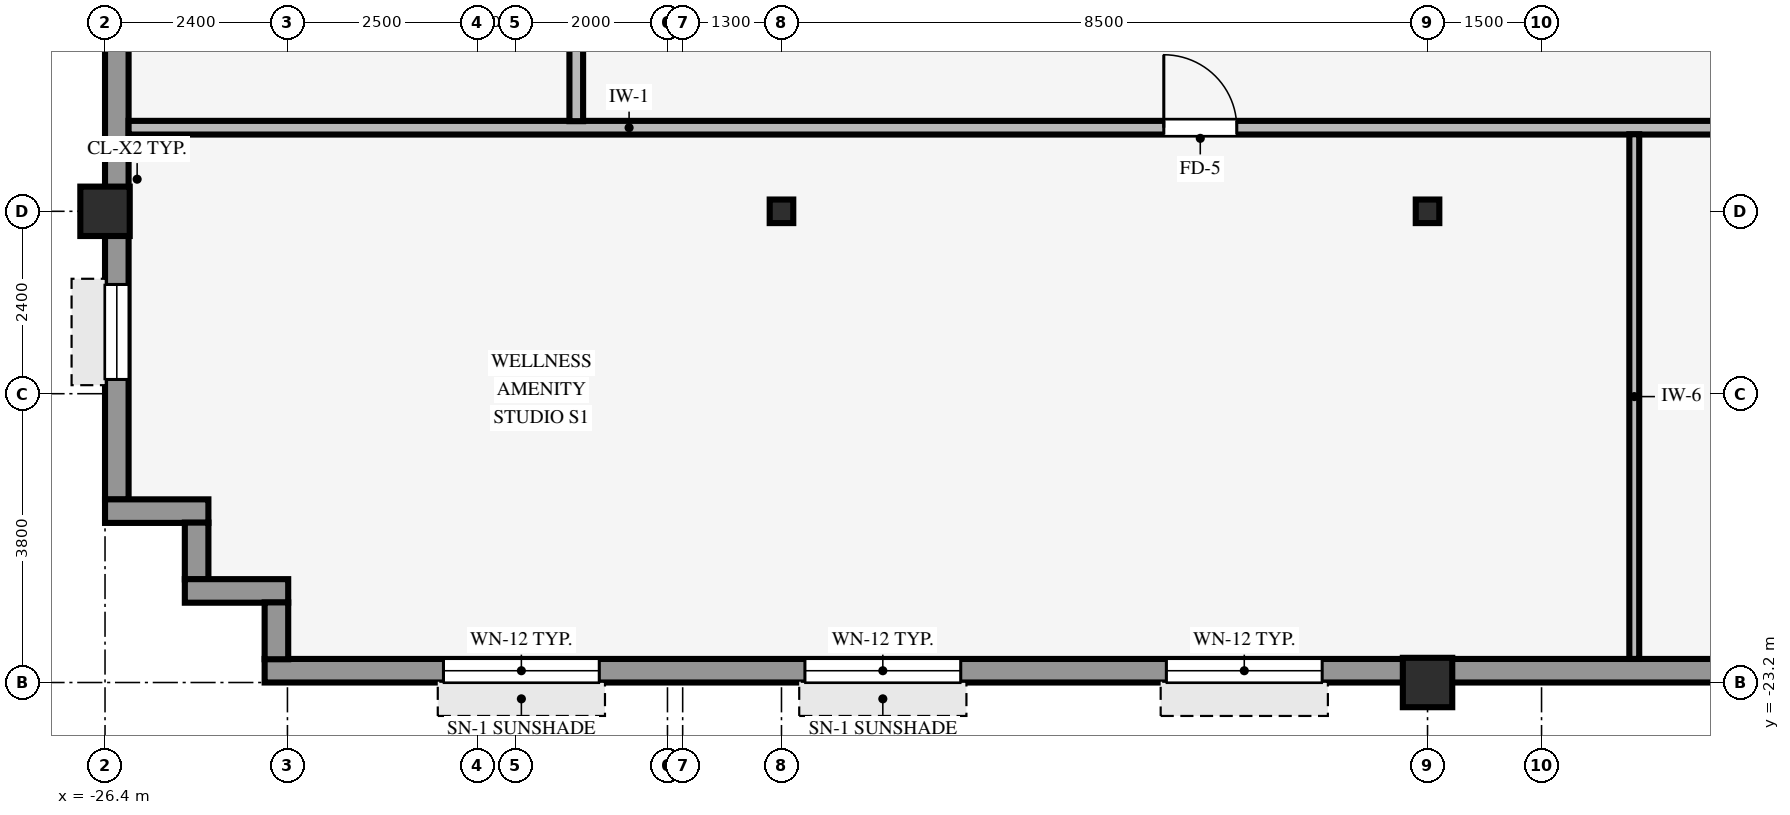
"""IFC4 building model, lengths in metres.
Left out: names, types, materials, properties, quantities, classifications, styles, units other than length and angle.
Written with IfcOpenShell. Run it as: python <this file> out.ifc"""

import sys

from ifc_helpers import new_model, si_unit, direction, frame, frame_2d, origin, origin_2d, place, context, subcontext, project, spatial, rectangle, hollow_rectangle, i_section, extrude, source, transform, mapped, element, fill, save


model = new_model("IFC4")
c1 = context("Model", 3, precision=1e-05, world=origin(), true_north=direction((0.0, 1.0)))
c2 = subcontext(c1, "Body", "Model", "MODEL_VIEW")
j1 = project(units=[si_unit("LENGTHUNIT", "METRE"), si_unit("PLANEANGLEUNIT", "RADIAN")], contexts=[c1])
p1 = place(None, origin())
s1 = spatial("IfcSite", under=j1, at=p1, CompositionType="ELEMENT")
p2 = place(p1, origin())
s2 = spatial("IfcBuilding", under=s1, at=p2, CompositionType="ELEMENT")
p3 = place(p2, frame((0.0, 0.0, 171.3)))
s3 = spatial("IfcBuildingStorey", under=s2, at=p3, CompositionType="ELEMENT", Elevation=171.3)
for number, where, z_axis, x_axis in (
    (1, (-26.4, -17.0, 0.0), (0.0, 0.0, 1.0), (1.0, 0.0, 0.0)),
    (2, (-9.0, -23.2, 0.0), (0.0, 0.0, 1.0), (1.0, 0.0, 0.0)),
):
    element("IfcColumn", number, at=place(p3, frame(where, z_axis=z_axis, x_axis=x_axis)), inside=s3, PredefinedType="COLUMN", context=c2, shape_type="SweptSolid", body=[
        extrude(hollow_rectangle(XDim=0.65, YDim=0.65, WallThickness=0.04, InnerFilletRadius=0.04, OuterFilletRadius=0.08, at=origin_2d()), origin(), (0.0, 0.0, 1.0), 3.37),
    ])
for number, where, z_axis, x_axis in (
    (3, (-17.5, -17.0, 0.0), (0.0, 0.0, 1.0), (1.0, 0.0, 0.0)),
    (4, (-9.0, -17.0, 0.0), (0.0, 0.0, 1.0), (1.0, 0.0, 0.0)),
):
    element("IfcColumn", number, at=place(p3, frame(where, z_axis=z_axis, x_axis=x_axis)), inside=s3, PredefinedType="COLUMN", context=c2, shape_type="SweptSolid", body=[
        extrude(i_section(OverallWidth=0.31, OverallDepth=0.31, WebThickness=0.015, FlangeThickness=0.015, FilletRadius=0.015, at=origin_2d()), origin(), (0.0, 0.0, 1.0), 3.37),
    ])
p4 = place(p3, frame((-24.3, -23.045, 0.0), z_axis=(0.0, 0.0, 1.0), x_axis=(1.0, 0.0, 0.0)))
e5 = element("IfcWall", 5, at=p4, inside=s3, PredefinedType="STANDARD", context=c2, shape_type="SweptSolid", body=[
    extrude(rectangle(XDim=44.8, YDim=0.31, at=frame_2d((22.4, 0.0))), origin(), (0.0, 0.0, 1.0), 2.705),
])
p5 = place(p4, frame((2.353, 0.0, 0.8)))
e6 = element("IfcOpeningElement", 6, at=p5, cuts=e5, PredefinedType="OPENING", context=c2, shape_type="SweptSolid", body=[
    extrude(rectangle(XDim=2.05, YDim=1.52, at=frame_2d((1.025, 0.76))), frame((0.0, 0.165, 0.0), z_axis=(0.0, -1.0, 0.0), x_axis=(1.0, 0.0, 0.0)), (0.0, 0.0, 1.0), 0.33),
])
p6 = place(p4, frame((7.108, 0.0, 0.8)))
e7 = element("IfcOpeningElement", 7, at=p6, cuts=e5, PredefinedType="OPENING", context=c2, shape_type="SweptSolid", body=[
    extrude(rectangle(XDim=2.05, YDim=1.52, at=frame_2d((1.025, 0.76))), frame((0.0, 0.165, 0.0), z_axis=(0.0, -1.0, 0.0), x_axis=(1.0, 0.0, 0.0)), (0.0, 0.0, 1.0), 0.33),
])
p7 = place(p4, frame((11.864, 0.0, 0.8)))
e8 = element("IfcOpeningElement", 8, at=p7, cuts=e5, PredefinedType="OPENING", context=c2, shape_type="SweptSolid", body=[
    extrude(rectangle(XDim=2.05, YDim=1.52, at=frame_2d((1.025, 0.76))), frame((0.0, 0.165, 0.0), z_axis=(0.0, -1.0, 0.0), x_axis=(1.0, 0.0, 0.0)), (0.0, 0.0, 1.0), 0.33),
])
p8 = place(p4, frame((21.375, 0.0, 0.8)))
e9 = element("IfcOpeningElement", 9, at=p8, cuts=e5, PredefinedType="OPENING", context=c2, shape_type="SweptSolid", body=[
    extrude(rectangle(XDim=2.05, YDim=1.52, at=frame_2d((1.025, 0.76))), frame((0.0, 0.165, 0.0), z_axis=(0.0, -1.0, 0.0), x_axis=(1.0, 0.0, 0.0)), (0.0, 0.0, 1.0), 0.33),
])
p9 = place(p4, frame((26.131, 0.0, 0.8)))
e10 = element("IfcOpeningElement", 10, at=p9, cuts=e5, PredefinedType="OPENING", context=c2, shape_type="SweptSolid", body=[
    extrude(rectangle(XDim=2.05, YDim=1.52, at=frame_2d((1.025, 0.76))), frame((0.0, 0.165, 0.0), z_axis=(0.0, -1.0, 0.0), x_axis=(1.0, 0.0, 0.0)), (0.0, 0.0, 1.0), 0.33),
])
p10 = place(p4, frame((29.986, 0.0, 0.8)))
e11 = element("IfcOpeningElement", 11, at=p10, cuts=e5, PredefinedType="OPENING", context=c2, shape_type="SweptSolid", body=[
    extrude(rectangle(XDim=2.05, YDim=1.52, at=frame_2d((1.025, 0.76))), frame((0.0, 0.165, 0.0), z_axis=(0.0, -1.0, 0.0), x_axis=(1.0, 0.0, 0.0)), (0.0, 0.0, 1.0), 0.33),
])
p11 = place(p4, frame((35.642, 0.0, 0.8)))
e12 = element("IfcOpeningElement", 12, at=p11, cuts=e5, PredefinedType="OPENING", context=c2, shape_type="SweptSolid", body=[
    extrude(rectangle(XDim=2.05, YDim=1.52, at=frame_2d((1.025, 0.76))), frame((0.0, 0.165, 0.0), z_axis=(0.0, -1.0, 0.0), x_axis=(1.0, 0.0, 0.0)), (0.0, 0.0, 1.0), 0.33),
])
p12 = place(p4, frame((40.397, 0.0, 0.8)))
e13 = element("IfcOpeningElement", 13, at=p12, cuts=e5, PredefinedType="OPENING", context=c2, shape_type="SweptSolid", body=[
    extrude(rectangle(XDim=2.05, YDim=1.52, at=frame_2d((1.025, 0.76))), frame((0.0, 0.165, 0.0), z_axis=(0.0, -1.0, 0.0), x_axis=(1.0, 0.0, 0.0)), (0.0, 0.0, 1.0), 0.33),
])
p13 = place(p3, frame((-26.245, -20.794, 0.0), z_axis=(0.0, 0.0, 1.0), x_axis=(0.0, 1.0, 0.0)))
e14 = element("IfcWall", 14, at=p13, inside=s3, PredefinedType="STANDARD", context=c2, shape_type="SweptSolid", body=[
    extrude(rectangle(XDim=37.788, YDim=0.31, at=frame_2d((18.894, 0.0))), origin(), (0.0, 0.0, 1.0), 2.705),
])
p14 = place(p13, frame((24.994, 0.0, 0.0)))
e15 = element("IfcOpeningElement", 15, at=p14, cuts=e14, PredefinedType="OPENING", context=c2, shape_type="SweptSolid", body=[
    extrude(rectangle(XDim=1.05, YDim=2.1, at=frame_2d((0.525, 1.05))), frame((0.0, 0.165, 0.0), z_axis=(0.0, -1.0, 0.0), x_axis=(1.0, 0.0, 0.0)), (0.0, 0.0, 1.0), 0.33),
])
p15 = place(p13, frame((1.581, 0.0, 0.8)))
e16 = element("IfcOpeningElement", 16, at=p15, cuts=e14, PredefinedType="OPENING", context=c2, shape_type="SweptSolid", body=[
    extrude(rectangle(XDim=1.25, YDim=1.52, at=frame_2d((0.625, 0.76))), frame((0.0, 0.165, 0.0), z_axis=(0.0, -1.0, 0.0), x_axis=(1.0, 0.0, 0.0)), (0.0, 0.0, 1.0), 0.33),
])
p16 = place(p13, frame((8.044, 0.0, 0.8)))
e17 = element("IfcOpeningElement", 17, at=p16, cuts=e14, PredefinedType="OPENING", context=c2, shape_type="SweptSolid", body=[
    extrude(rectangle(XDim=1.25, YDim=1.52, at=frame_2d((0.625, 0.76))), frame((0.0, 0.165, 0.0), z_axis=(0.0, -1.0, 0.0), x_axis=(1.0, 0.0, 0.0)), (0.0, 0.0, 1.0), 0.33),
])
p17 = place(p13, frame((13.156, 0.0, 0.8)))
e18 = element("IfcOpeningElement", 18, at=p17, cuts=e14, PredefinedType="OPENING", context=c2, shape_type="SweptSolid", body=[
    extrude(rectangle(XDim=1.25, YDim=1.52, at=frame_2d((0.625, 0.76))), frame((0.0, 0.165, 0.0), z_axis=(0.0, -1.0, 0.0), x_axis=(1.0, 0.0, 0.0)), (0.0, 0.0, 1.0), 0.33),
])
p18 = place(p13, frame((18.269, 0.0, 0.8)))
e19 = element("IfcOpeningElement", 19, at=p18, cuts=e14, PredefinedType="OPENING", context=c2, shape_type="SweptSolid", body=[
    extrude(rectangle(XDim=1.25, YDim=1.52, at=frame_2d((0.625, 0.76))), frame((0.0, 0.165, 0.0), z_axis=(0.0, -1.0, 0.0), x_axis=(1.0, 0.0, 0.0)), (0.0, 0.0, 1.0), 0.33),
])
p19 = place(p13, frame((23.382, 0.0, 0.8)))
e20 = element("IfcOpeningElement", 20, at=p19, cuts=e14, PredefinedType="OPENING", context=c2, shape_type="SweptSolid", body=[
    extrude(rectangle(XDim=1.25, YDim=1.52, at=frame_2d((0.625, 0.76))), frame((0.0, 0.165, 0.0), z_axis=(0.0, -1.0, 0.0), x_axis=(1.0, 0.0, 0.0)), (0.0, 0.0, 1.0), 0.33),
])
p20 = place(p13, frame((28.044, 0.0, 0.8)))
e21 = element("IfcOpeningElement", 21, at=p20, cuts=e14, PredefinedType="OPENING", context=c2, shape_type="SweptSolid", body=[
    extrude(rectangle(XDim=1.25, YDim=1.52, at=frame_2d((0.625, 0.76))), frame((0.0, 0.165, 0.0), z_axis=(0.0, -1.0, 0.0), x_axis=(1.0, 0.0, 0.0)), (0.0, 0.0, 1.0), 0.33),
])
p21 = place(p13, frame((33.607, 0.0, 0.8)))
e22 = element("IfcOpeningElement", 22, at=p21, cuts=e14, PredefinedType="OPENING", context=c2, shape_type="SweptSolid", body=[
    extrude(rectangle(XDim=1.25, YDim=1.52, at=frame_2d((0.625, 0.76))), frame((0.0, 0.165, 0.0), z_axis=(0.0, -1.0, 0.0), x_axis=(1.0, 0.0, 0.0)), (0.0, 0.0, 1.0), 0.33),
])
p22 = place(p3, frame((-26.4, -20.945, 0.0), z_axis=(0.0, 0.0, 1.0), x_axis=(1.0, 0.0, 0.0)))
e23 = element("IfcWall", 23, at=p22, inside=s3, PredefinedType="STANDARD", context=c2, shape_type="SweptSolid", body=[
    extrude(rectangle(XDim=1.36, YDim=0.31, at=frame_2d((0.68, 0.0))), origin(), (0.0, 0.0, 1.0), 3.36),
])
p23 = place(p3, frame((-25.195, -21.844, 0.0), z_axis=(0.0, 0.0, 1.0), x_axis=(0.0, 1.0, 0.0)))
e24 = element("IfcWall", 24, at=p23, inside=s3, PredefinedType="STANDARD", context=c2, shape_type="SweptSolid", body=[
    extrude(rectangle(XDim=0.748, YDim=0.31, at=frame_2d((0.374, 0.0))), origin(), (0.0, 0.0, 1.0), 3.36),
])
p24 = place(p3, frame((-25.35, -21.995, 0.0), z_axis=(0.0, 0.0, 1.0), x_axis=(1.0, 0.0, 0.0)))
e25 = element("IfcWall", 25, at=p24, inside=s3, PredefinedType="STANDARD", context=c2, shape_type="SweptSolid", body=[
    extrude(rectangle(XDim=1.36, YDim=0.31, at=frame_2d((0.68, 0.0))), origin(), (0.0, 0.0, 1.0), 3.36),
])
p25 = place(p3, frame((-24.145, -22.894, 0.0), z_axis=(0.0, 0.0, 1.0), x_axis=(0.0, 1.0, 0.0)))
e26 = element("IfcWall", 26, at=p25, inside=s3, PredefinedType="STANDARD", context=c2, shape_type="SweptSolid", body=[
    extrude(rectangle(XDim=0.748, YDim=0.31, at=frame_2d((0.374, 0.0))), origin(), (0.0, 0.0, 1.0), 3.36),
])
p26 = place(p3, frame((-26.09, -15.9, 0.0), z_axis=(0.0, 0.0, 1.0), x_axis=(1.0, 0.0, 0.0)))
e27 = element("IfcWall", 27, at=p26, inside=s3, PredefinedType="PARTITIONING", context=c2, shape_type="SweptSolid", body=[
    extrude(rectangle(XDim=48.38, YDim=0.18, at=frame_2d((24.19, 0.0))), origin(), (0.0, 0.0, 1.0), 3.36),
])
p27 = place(p26, frame((26.51, 0.0, 0.0)))
e28 = element("IfcOpeningElement", 28, at=p27, cuts=e27, PredefinedType="OPENING", context=c2, shape_type="SweptSolid", body=[
    extrude(rectangle(XDim=0.96, YDim=2.1, at=frame_2d((0.48, 1.05))), frame((0.0, 0.1, 0.0), z_axis=(0.0, -1.0, 0.0), x_axis=(1.0, 0.0, 0.0)), (0.0, 0.0, 1.0), 0.2),
])
p28 = place(p26, frame((40.51, 0.0, 0.0)))
e29 = element("IfcOpeningElement", 29, at=p28, cuts=e27, PredefinedType="OPENING", context=c2, shape_type="SweptSolid", body=[
    extrude(rectangle(XDim=0.96, YDim=2.1, at=frame_2d((0.48, 1.05))), frame((0.0, 0.1, 0.0), z_axis=(0.0, -1.0, 0.0), x_axis=(1.0, 0.0, 0.0)), (0.0, 0.0, 1.0), 0.2),
])
p29 = place(p26, frame((13.62, 0.0, 0.0)))
e30 = element("IfcOpeningElement", 30, at=p29, cuts=e27, PredefinedType="OPENING", context=c2, shape_type="SweptSolid", body=[
    extrude(rectangle(XDim=0.96, YDim=2.1, at=frame_2d((0.48, 1.05))), frame((0.0, 0.1, 0.0), z_axis=(0.0, -1.0, 0.0), x_axis=(1.0, 0.0, 0.0)), (0.0, 0.0, 1.0), 0.2),
])
p30 = place(p3, frame((-20.2, -15.814, 0.0), z_axis=(0.0, 0.0, 1.0), x_axis=(0.0, 1.0, 0.0)))
e31 = element("IfcWall", 31, at=p30, inside=s3, PredefinedType="PARTITIONING", context=c2, shape_type="SweptSolid", body=[
    extrude(rectangle(XDim=31.628, YDim=0.18, at=frame_2d((15.814, 0.0))), origin(), (0.0, 0.0, 1.0), 3.36),
])
p31 = place(p30, frame((20.334, 0.0, 0.0)))
e32 = element("IfcOpeningElement", 32, at=p31, cuts=e31, PredefinedType="OPENING", context=c2, shape_type="SweptSolid", body=[
    extrude(rectangle(XDim=0.96, YDim=2.1, at=frame_2d((0.48, 1.05))), frame((0.0, 0.1, 0.0), z_axis=(0.0, -1.0, 0.0), x_axis=(1.0, 0.0, 0.0)), (0.0, 0.0, 1.0), 0.2),
])
p32 = place(p30, frame((6.834, 0.0, 0.0)))
e33 = element("IfcOpeningElement", 33, at=p32, cuts=e31, PredefinedType="OPENING", context=c2, shape_type="SweptSolid", body=[
    extrude(rectangle(XDim=0.96, YDim=2.1, at=frame_2d((0.48, 1.05))), frame((0.0, 0.1, 0.0), z_axis=(0.0, -1.0, 0.0), x_axis=(1.0, 0.0, 0.0)), (0.0, 0.0, 1.0), 0.2),
])
p33 = place(p3, frame((-6.28, -22.89, 0.0), z_axis=(0.0, 0.0, 1.0), x_axis=(0.0, 1.0, 0.0)))
e34 = element("IfcWall", 34, at=p33, inside=s3, PredefinedType="PARTITIONING", context=c2, shape_type="SweptSolid", body=[
    extrude(rectangle(XDim=6.904, YDim=0.13, at=frame_2d((3.452, 0.0))), origin(), (0.0, 0.0, 1.0), 3.36),
])
m1 = source(origin(), c2, "Body", "SweptSolid", [
    extrude(rectangle(XDim=2.05, YDim=1.52, at=frame_2d((1.025, 0.76))), frame((0.0, 0.03, 0.0), z_axis=(0.0, -1.0, 0.0), x_axis=(1.0, 0.0, 0.0)), (0.0, 0.0, 1.0), 0.06),
])
p34 = place(p5, origin())
e35 = element("IfcWindow", 35, at=p34, inside=s3, PartitioningType="SINGLE_PANEL", PredefinedType="WINDOW", context=c2, shape_type="MappedRepresentation", body=[
    mapped(m1, transform((0.0, 0.0, 0.0), scale=1.0)),
])
fill(e6, e35)
p35 = place(p6, origin())
e36 = element("IfcWindow", 36, at=p35, inside=s3, PartitioningType="SINGLE_PANEL", PredefinedType="WINDOW", context=c2, shape_type="MappedRepresentation", body=[
    mapped(m1, transform((0.0, 0.0, 0.0), scale=1.0)),
])
fill(e7, e36)
p36 = place(p7, origin())
e37 = element("IfcWindow", 37, at=p36, inside=s3, PartitioningType="SINGLE_PANEL", PredefinedType="WINDOW", context=c2, shape_type="MappedRepresentation", body=[
    mapped(m1, transform((0.0, 0.0, 0.0), scale=1.0)),
])
fill(e8, e37)
m2 = source(origin(), c2, "Body", "SweptSolid", [
    extrude(rectangle(XDim=1.25, YDim=1.52, at=frame_2d((0.625, 0.76))), frame((0.0, 0.03, 0.0), z_axis=(0.0, -1.0, 0.0), x_axis=(1.0, 0.0, 0.0)), (0.0, 0.0, 1.0), 0.06),
])
p37 = place(p15, origin())
e38 = element("IfcWindow", 38, at=p37, inside=s3, PartitioningType="SINGLE_PANEL", PredefinedType="WINDOW", context=c2, shape_type="MappedRepresentation", body=[
    mapped(m2, transform((0.0, 0.0, 0.0), scale=1.0)),
])
fill(e16, e38)
m3 = source(origin(), c2, "Body", "SweptSolid", [
    extrude(rectangle(XDim=0.96, YDim=2.1, at=frame_2d((0.48, 1.05))), frame((0.0, 0.025, 0.0), z_axis=(0.0, -1.0, 0.0), x_axis=(1.0, 0.0, 0.0)), (0.0, 0.0, 1.0), 0.05),
])
p38 = place(p29, origin())
e39 = element("IfcDoor", 39, at=p38, inside=s3, OperationType="SINGLE_SWING_LEFT", PredefinedType="DOOR", context=c2, shape_type="MappedRepresentation", body=[
    mapped(m3, transform((0.0, 0.0, 0.0), scale=1.0)),
])
fill(e30, e39)
save(model, sys.argv[1])
